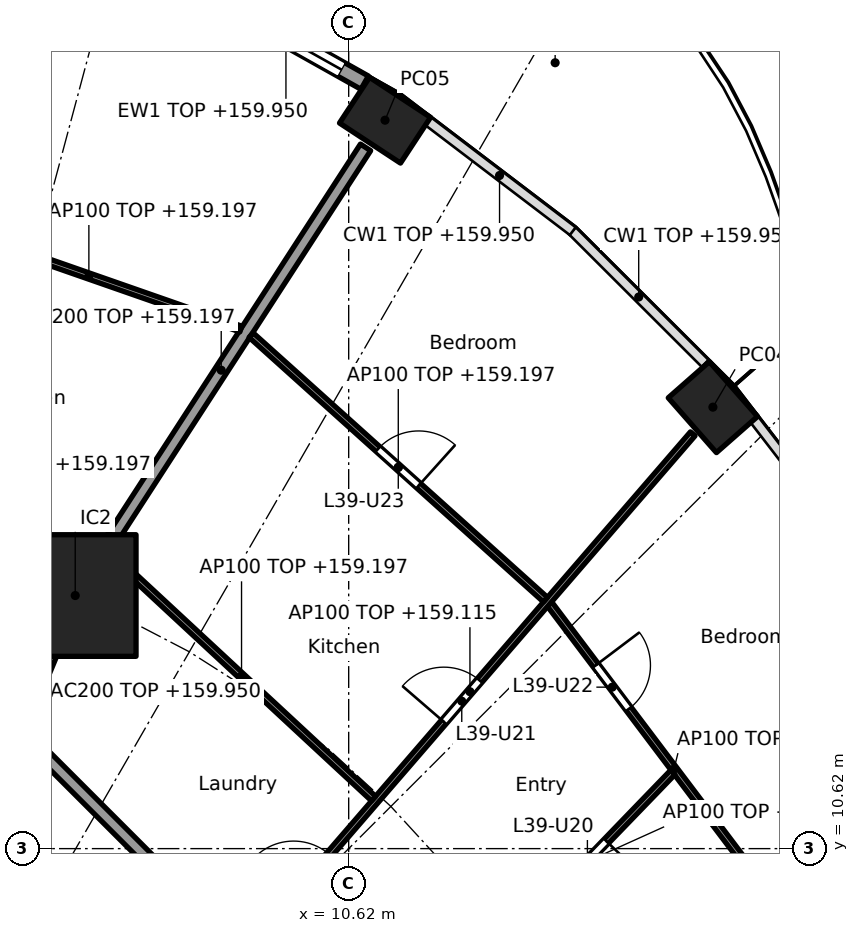
"""IFC4 building model, lengths in metres.
Left out: names, types, materials, properties, quantities, classifications, styles, units other than length and angle.
Written with IfcOpenShell. Run it as: python <this file> out.ifc"""

import sys

from ifc_helpers import new_model, si_unit, direction, frame, frame_2d, origin, origin_2d, place, context, subcontext, project, spatial, rectangle, hollow_rectangle, extrude, element, fill, save


model = new_model("IFC4")
c1 = context("Model", 3, precision=1e-05, world=origin(), true_north=direction((0.0, 1.0)))
c2 = subcontext(c1, "Body", "Model", "MODEL_VIEW")
j1 = project(units=[si_unit("LENGTHUNIT", "METRE"), si_unit("PLANEANGLEUNIT", "RADIAN")], contexts=[c1])
p1 = place(None, origin())
s1 = spatial("IfcSite", under=j1, at=p1, CompositionType="ELEMENT")
p2 = place(p1, origin())
s2 = spatial("IfcBuilding", under=s1, at=p2, CompositionType="ELEMENT")
p3 = place(p2, frame((0.0, 0.0, 156.6)))
s3 = spatial("IfcBuildingStorey", under=s2, at=p3, CompositionType="ELEMENT", Elevation=156.6)
for number, where, z_axis, x_axis in (
    (1, (16.61, 17.88, 0.0), (0.0, 0.0, 1.0), (-0.66, 0.751, 0.0)),
    (2, (11.218, 22.599, 0.0), (0.0, 0.0, 1.0), (-0.836, 0.549, 0.0)),
):
    element("IfcColumn", number, at=place(p3, frame(where, z_axis=z_axis, x_axis=x_axis)), inside=s3, PredefinedType="COLUMN", context=c2, shape_type="SweptSolid", body=[
        extrude(hollow_rectangle(XDim=1.2, YDim=0.9, WallThickness=0.04, at=origin_2d()), origin(), (0.0, 0.0, 1.0), 3.7),
    ])
p4 = place(p3, frame((6.123, 14.782, 0.0), z_axis=(0.0, 0.0, 1.0), x_axis=(1.0, 0.0, 0.0)))
e3 = element("IfcColumn", 3, at=p4, inside=s3, PredefinedType="COLUMN", context=c2, shape_type="SweptSolid", body=[
    extrude(rectangle(XDim=2.0, YDim=2.0, at=origin_2d()), origin(), (0.0, 0.0, 1.0), 3.7),
])
p5 = place(p3, frame((8.293, 24.67, 0.0), z_axis=(0.0, 0.0, 1.0), x_axis=(0.87206688547, -0.489386705241, 0.0)))
e4 = element("IfcWall", 4, at=p5, inside=s3, PredefinedType="SOLIDWALL", context=c2, shape_type="SweptSolid", body=[
    extrude(rectangle(XDim=2.97, YDim=0.25, at=frame_2d((1.485, 0.0))), origin(), (0.0, 0.0, 1.0), 3.35),
])
p6 = place(p5, frame((0.435, 0.0, 0.0)))
e5 = element("IfcOpeningElement", 5, at=p6, cuts=e4, PredefinedType="OPENING", context=c2, shape_type="SweptSolid", body=[
    extrude(rectangle(XDim=2.1, YDim=2.4, at=frame_2d((1.05, 1.2))), frame((0.0, 0.135, 0.0), z_axis=(0.0, -1.0, 0.0), x_axis=(1.0, 0.0, 0.0)), (0.0, 0.0, 1.0), 0.27),
])
p7 = place(p3, frame((14.819, 6.157, 0.0), z_axis=(0.0, 0.0, 1.0), x_axis=(0.737608883396, 0.675228209671, 0.0)))
e6 = element("IfcWall", 6, at=p7, inside=s3, PredefinedType="PARTITIONING", context=c2, shape_type="SweptSolid", body=[
    extrude(rectangle(XDim=7.596, YDim=0.2, at=frame_2d((3.798, 0.0))), origin(), (0.0, 0.0, 1.0), 3.35),
])
p8 = place(p3, frame((5.243, 12.657, 0.0), z_axis=(0.0, 0.0, 1.0), x_axis=(0.38273085373, 0.923859888513, 0.0)))
e7 = element("IfcWall", 7, at=p8, inside=s3, PredefinedType="PARTITIONING", context=c2, shape_type="SweptSolid", body=[
    extrude(rectangle(XDim=2.199, YDim=0.2, at=frame_2d((1.1, 0.0))), origin(), (0.0, 0.0, 1.0), 3.35),
])
p9 = place(p3, frame((6.15, 14.824, 0.0), z_axis=(0.0, 0.0, 1.0), x_axis=(0.543695254109, 0.839282711998, 0.0)))
e8 = element("IfcWall", 8, at=p9, inside=s3, PredefinedType="PARTITIONING", context=c2, shape_type="SweptSolid", body=[
    extrude(rectangle(XDim=8.731, YDim=0.2, at=frame_2d((4.366, 0.0))), origin(), (0.0, 0.0, 1.0), 2.597),
])
p10 = place(p3, frame((12.635, 5.134, 0.0), z_axis=(0.0, 0.0, 1.0), x_axis=(-0.707106781187, 0.707106781187, 0.0)))
e9 = element("IfcWall", 9, at=p10, inside=s3, PredefinedType="PARTITIONING", context=c2, shape_type="SweptSolid", body=[
    extrude(rectangle(XDim=10.609, YDim=0.2, at=frame_2d((5.305, 0.0))), origin(), (0.0, 0.0, 1.0), 3.35),
])
p11 = place(p10, frame((3.503, 0.0, 0.0)))
e10 = element("IfcOpeningElement", 10, at=p11, cuts=e9, PredefinedType="OPENING", context=c2, shape_type="SweptSolid", body=[
    extrude(rectangle(XDim=1.0, YDim=2.1, at=frame_2d((0.5, 1.05))), frame((0.0, 0.11, 0.0), z_axis=(0.0, -1.0, 0.0), x_axis=(1.0, 0.0, 0.0)), (0.0, 0.0, 1.0), 0.22),
])
p12 = place(p3, frame((18.016, 9.218, 0.0), z_axis=(0.0, 0.0, 1.0), x_axis=(-0.602406473922, 0.798189476363, 0.0)))
e11 = element("IfcWall", 11, at=p12, inside=s3, PredefinedType="PARTITIONING", context=c2, shape_type="SweptSolid", body=[
    extrude(rectangle(XDim=6.794, YDim=0.1, at=frame_2d((3.397, 0.0))), origin(), (0.0, 0.0, 1.0), 2.597),
])
p13 = place(p12, frame((4.633, 0.0, 0.0)))
e12 = element("IfcOpeningElement", 12, at=p13, cuts=e11, PredefinedType="OPENING", context=c2, shape_type="SweptSolid", body=[
    extrude(rectangle(XDim=0.9, YDim=2.1, at=frame_2d((0.45, 1.05))), frame((0.0, 0.06, 0.0), z_axis=(0.0, -1.0, 0.0), x_axis=(1.0, 0.0, 0.0)), (0.0, 0.0, 1.0), 0.12),
])
p14 = place(p3, frame((13.107, 8.929, 0.0), z_axis=(0.0, 0.0, 1.0), x_axis=(0.694592384931, 0.719403515974, 0.0)))
e13 = element("IfcWall", 13, at=p14, inside=s3, PredefinedType="PARTITIONING", context=c2, shape_type="SweptSolid", body=[
    extrude(rectangle(XDim=4.094, YDim=0.1, at=frame_2d((2.047, 0.0))), origin(), (0.0, 0.0, 1.0), 3.35),
])
p15 = place(p14, frame((1.622, 0.0, 0.0)))
e14 = element("IfcOpeningElement", 14, at=p15, cuts=e13, PredefinedType="OPENING", context=c2, shape_type="SweptSolid", body=[
    extrude(rectangle(XDim=0.9, YDim=2.1, at=frame_2d((0.45, 1.05))), frame((0.0, 0.06, 0.0), z_axis=(0.0, -1.0, 0.0), x_axis=(1.0, 0.0, 0.0)), (0.0, 0.0, 1.0), 0.12),
])
p16 = place(p3, frame((8.95, 8.96, 0.0), z_axis=(0.0, 0.0, 1.0), x_axis=(0.653830241148, 0.756641272837, 0.0)))
e15 = element("IfcWall", 15, at=p16, inside=s3, PredefinedType="PARTITIONING", context=c2, shape_type="SweptSolid", body=[
    extrude(rectangle(XDim=11.208, YDim=0.1, at=frame_2d((5.604, 0.0))), origin(), (0.0, 0.0, 1.0), 2.515),
])
p17 = place(p16, frame((1.168, 0.0, 0.0)))
e16 = element("IfcOpeningElement", 16, at=p17, cuts=e15, PredefinedType="OPENING", context=c2, shape_type="SweptSolid", body=[
    extrude(rectangle(XDim=0.9, YDim=2.1, at=frame_2d((0.45, 1.05))), frame((0.0, 0.06, 0.0), z_axis=(0.0, -1.0, 0.0), x_axis=(1.0, 0.0, 0.0)), (0.0, 0.0, 1.0), 0.12),
])
p18 = place(p16, frame((4.948, 0.0, 0.0)))
e17 = element("IfcOpeningElement", 17, at=p18, cuts=e15, PredefinedType="OPENING", context=c2, shape_type="SweptSolid", body=[
    extrude(rectangle(XDim=0.9, YDim=2.1, at=frame_2d((0.45, 1.05))), frame((0.0, 0.06, 0.0), z_axis=(0.0, -1.0, 0.0), x_axis=(1.0, 0.0, 0.0)), (0.0, 0.0, 1.0), 0.12),
])
p19 = place(p3, frame((11.029, 11.443, 0.0), z_axis=(0.0, 0.0, 1.0), x_axis=(-0.733113447346, 0.680106369122, 0.0)))
e18 = element("IfcWall", 18, at=p19, inside=s3, PredefinedType="PARTITIONING", context=c2, shape_type="SweptSolid", body=[
    extrude(rectangle(XDim=5.923, YDim=0.1, at=frame_2d((2.961, 0.0))), origin(), (0.0, 0.0, 1.0), 2.597),
])
p20 = place(p3, frame((13.856, 14.714, 0.0), z_axis=(0.0, 0.0, 1.0), x_axis=(-0.743799395746, 0.668402916577, 0.0)))
e19 = element("IfcWall", 19, at=p20, inside=s3, PredefinedType="PARTITIONING", context=c2, shape_type="SweptSolid", body=[
    extrude(rectangle(XDim=6.509, YDim=0.1, at=frame_2d((3.254, 0.0))), origin(), (0.0, 0.0, 1.0), 2.597),
])
p21 = place(p20, frame((2.804, 0.0, 0.0)))
e20 = element("IfcOpeningElement", 20, at=p21, cuts=e19, PredefinedType="OPENING", context=c2, shape_type="SweptSolid", body=[
    extrude(rectangle(XDim=0.9, YDim=2.1, at=frame_2d((0.45, 1.05))), frame((0.0, 0.06, 0.0), z_axis=(0.0, -1.0, 0.0), x_axis=(1.0, 0.0, 0.0)), (0.0, 0.0, 1.0), 0.12),
])
p22 = place(p3, frame((6.515, 15.556, 0.0), z_axis=(0.0, 0.0, 1.0), x_axis=(-0.986271328884, 0.16513287323, 0.0)))
e21 = element("IfcWall", 21, at=p22, inside=s3, PredefinedType="PARTITIONING", context=c2, shape_type="SweptSolid", body=[
    extrude(rectangle(XDim=3.884, YDim=0.1, at=frame_2d((1.942, 0.0))), origin(), (0.0, 0.0, 1.0), 2.597),
])
p23 = place(p3, frame((8.846, 19.165, 0.0), z_axis=(0.0, 0.0, 1.0), x_axis=(-0.944186503813, 0.329411362915, 0.0)))
e22 = element("IfcWall", 22, at=p23, inside=s3, PredefinedType="PARTITIONING", context=c2, shape_type="SweptSolid", body=[
    extrude(rectangle(XDim=5.293, YDim=0.1, at=frame_2d((2.646, 0.0))), origin(), (0.0, 0.0, 1.0), 2.597),
])
p24 = place(p6, origin())
e23 = element("IfcDoor", 23, at=p24, inside=s3, OperationType="SLIDING_TO_LEFT", PredefinedType="DOOR", context=c2, shape_type="SweptSolid", body=[
    extrude(rectangle(XDim=2.1, YDim=2.4, at=frame_2d((1.05, 1.2))), frame((0.0, 0.025, 0.0), z_axis=(0.0, -1.0, 0.0), x_axis=(1.0, 0.0, 0.0)), (0.0, 0.0, 1.0), 0.05),
])
fill(e5, e23)
p25 = place(p15, frame((0.9, 0.0, 0.0), x_axis=(-1.0, 0.0, 0.0)))
e24 = element("IfcDoor", 24, at=p25, inside=s3, OperationType="SINGLE_SWING_LEFT", PredefinedType="DOOR", context=c2, shape_type="SweptSolid", body=[
    extrude(rectangle(XDim=0.9, YDim=2.1, at=frame_2d((0.45, 1.05))), frame((0.0, 0.025, 0.0), z_axis=(0.0, -1.0, 0.0), x_axis=(1.0, 0.0, 0.0)), (0.0, 0.0, 1.0), 0.05),
])
fill(e14, e24)
p26 = place(p18, origin())
e25 = element("IfcDoor", 25, at=p26, inside=s3, OperationType="SINGLE_SWING_LEFT", PredefinedType="DOOR", context=c2, shape_type="SweptSolid", body=[
    extrude(rectangle(XDim=0.9, YDim=2.1, at=frame_2d((0.45, 1.05))), frame((0.0, 0.025, 0.0), z_axis=(0.0, -1.0, 0.0), x_axis=(1.0, 0.0, 0.0)), (0.0, 0.0, 1.0), 0.05),
])
fill(e17, e25)
p27 = place(p13, frame((0.9, 0.0, 0.0), x_axis=(-1.0, 0.0, 0.0)))
e26 = element("IfcDoor", 26, at=p27, inside=s3, OperationType="SINGLE_SWING_LEFT", PredefinedType="DOOR", context=c2, shape_type="SweptSolid", body=[
    extrude(rectangle(XDim=0.9, YDim=2.1, at=frame_2d((0.45, 1.05))), frame((0.0, 0.025, 0.0), z_axis=(0.0, -1.0, 0.0), x_axis=(1.0, 0.0, 0.0)), (0.0, 0.0, 1.0), 0.05),
])
fill(e12, e26)
p28 = place(p21, frame((0.9, 0.0, 0.0), x_axis=(-1.0, 0.0, 0.0)))
e27 = element("IfcDoor", 27, at=p28, inside=s3, OperationType="SINGLE_SWING_RIGHT", PredefinedType="DOOR", context=c2, shape_type="SweptSolid", body=[
    extrude(rectangle(XDim=0.9, YDim=2.1, at=frame_2d((0.45, 1.05))), frame((0.0, 0.025, 0.0), z_axis=(0.0, -1.0, 0.0), x_axis=(1.0, 0.0, 0.0)), (0.0, 0.0, 1.0), 0.05),
])
fill(e20, e27)
save(model, sys.argv[1])
